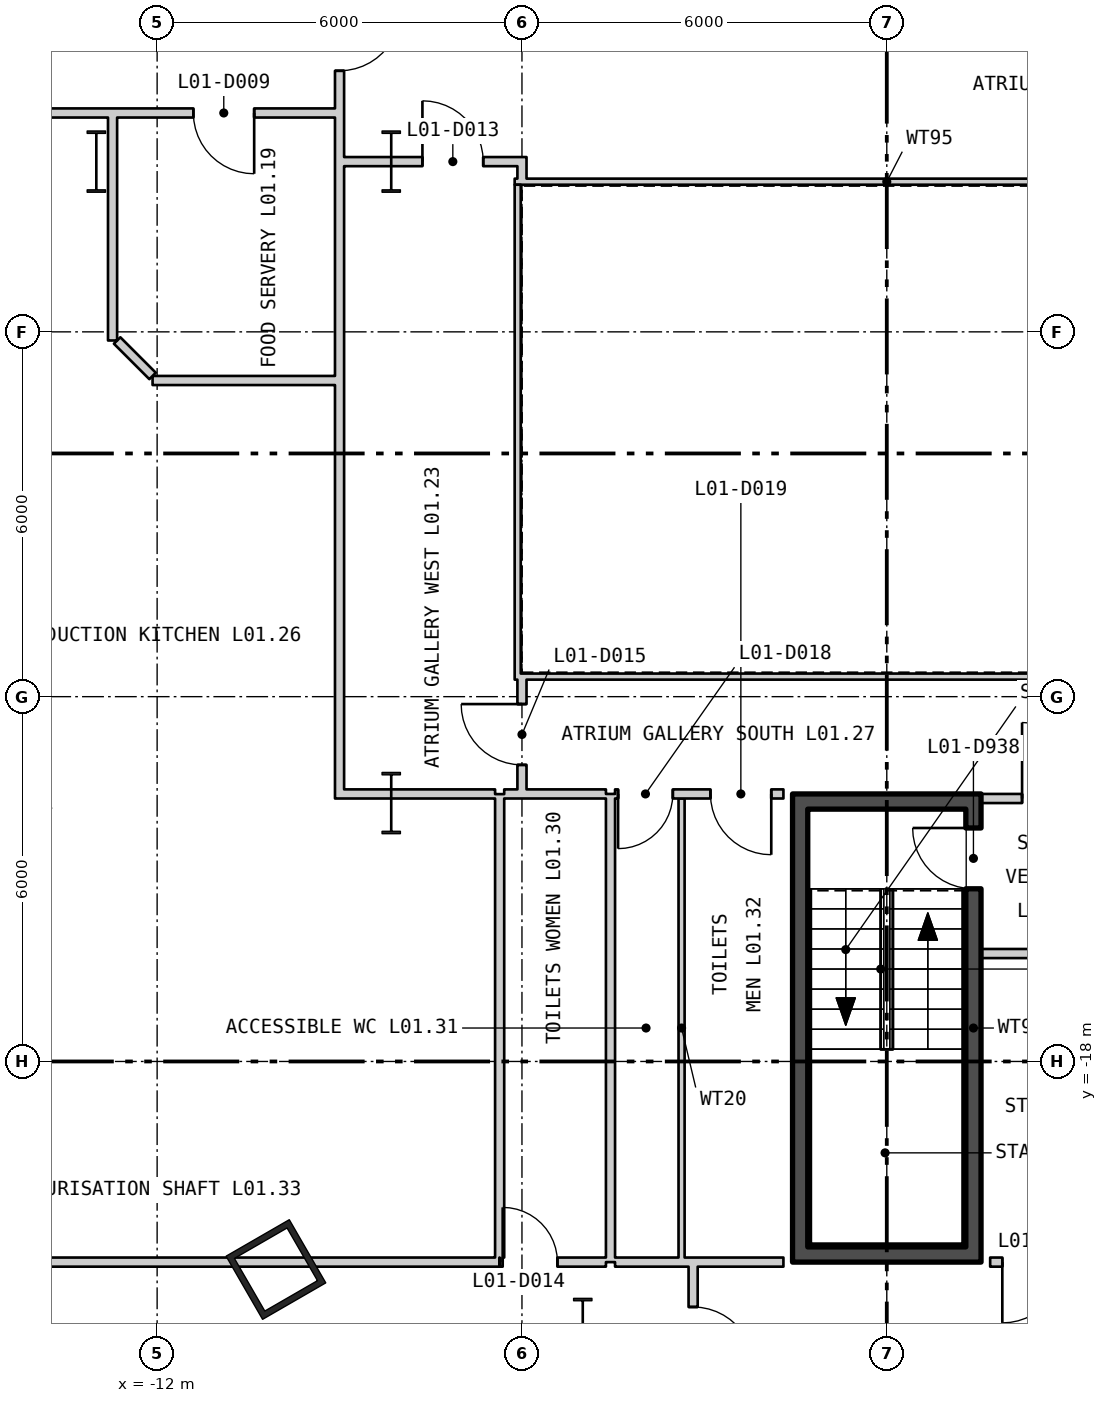
"""IFC4 building model, lengths in metres.
Left out: names, types, materials, properties, quantities, classifications, styles, units other than length and angle.
Written with IfcOpenShell. Run it as: python <this file> out.ifc"""

import sys

from ifc_helpers import new_model, si_unit, direction, frame, frame_2d, origin, origin_2d, place, context, subcontext, project, spatial, rectangle, hollow_rectangle, i_section, extrude, element, fill, save


model = new_model("IFC4")
c1 = context("Model", 3, precision=1e-05, world=origin(), true_north=direction((0.0, 1.0)))
c2 = subcontext(c1, "Body", "Model", "MODEL_VIEW")
j1 = project(units=[si_unit("LENGTHUNIT", "METRE"), si_unit("PLANEANGLEUNIT", "RADIAN")], contexts=[c1])
p1 = place(None, origin())
s1 = spatial("IfcSite", under=j1, at=p1, CompositionType="ELEMENT")
p2 = place(p1, origin())
s2 = spatial("IfcBuilding", under=s1, at=p2, CompositionType="ELEMENT")
p3 = place(p2, frame((0.0, 0.0, 8.4)))
s3 = spatial("IfcBuildingStorey", under=s2, at=p3, CompositionType="ELEMENT", Elevation=8.4)
p4 = place(p3, frame((-10.046, -21.422, 0.0), z_axis=(0.0, 0.0, 1.0), x_axis=(0.5, -0.866025403784, 0.0)))
e1 = element("IfcColumn", 1, at=p4, inside=s3, PredefinedType="COLUMN", context=c2, shape_type="SweptSolid", body=[
    extrude(hollow_rectangle(XDim=1.2, YDim=1.2, WallThickness=0.1, at=origin_2d()), origin(), (0.0, 0.0, 1.0), 5.1),
])
for number, where, z_axis, x_axis in (
    (2, (-8.15, -3.2, 0.0), (0.0, 0.0, 1.0), (1.0, 0.0, 0.0)),
    (3, (-8.15, -13.75, 0.0), (0.0, 0.0, 1.0), (1.0, 0.0, 0.0)),
    (4, (-5.0, -22.4, 0.0), (0.0, 0.0, 1.0), (1.0, 0.0, 0.0)),
    (5, (-13.0, -3.2, 0.0), (0.0, 0.0, 1.0), (1.0, 0.0, 0.0)),
):
    element("IfcColumn", number, at=place(p3, frame(where, z_axis=z_axis, x_axis=x_axis)), inside=s3, PredefinedType="COLUMN", context=c2, shape_type="SweptSolid", body=[
        extrude(i_section(OverallWidth=0.302, OverallDepth=1.008, WebThickness=0.021, FlangeThickness=0.04, at=origin_2d()), origin(), (0.0, 0.0, 1.0), 5.1),
    ])
for number, where, z_axis, x_axis in (
    (6, (-6.12, -11.67, 0.0), (0.0, 0.0, 1.0), (1.0, 0.0, 0.0)),
    (7, (6.12, -3.53, 0.0), (0.0, 0.0, 1.0), (-1.0, 0.0, 0.0)),
):
    element("IfcWall", number, at=place(p3, frame(where, z_axis=z_axis, x_axis=x_axis)), inside=s3, PredefinedType="PARTITIONING", context=c2, shape_type="SweptSolid", body=[
        extrude(rectangle(XDim=12.24, YDim=0.1, at=frame_2d((6.12, 0.0))), origin(), (0.0, 0.0, 1.0), 4.88),
    ])
p5 = place(p3, frame((-6.07, -3.58, 0.0), z_axis=(0.0, 0.0, 1.0), x_axis=(0.0, -1.0, 0.0)))
e8 = element("IfcWall", 8, at=p5, inside=s3, PredefinedType="PARTITIONING", context=c2, shape_type="SweptSolid", body=[
    extrude(rectangle(XDim=8.04, YDim=0.1, at=frame_2d((4.02, 0.0))), origin(), (0.0, 0.0, 1.0), 4.88),
])
p6 = place(p3, frame((-1.425, -21.05, 0.0), z_axis=(0.0, 0.0, 1.0), x_axis=(0.0, 1.0, 0.0)))
e9 = element("IfcWall", 9, at=p6, inside=s3, PredefinedType="SHEAR", context=c2, shape_type="SweptSolid", body=[
    extrude(rectangle(XDim=7.2, YDim=0.25, at=frame_2d((3.6, 0.0))), origin(), (0.0, 0.0, 1.0), 4.88),
])
p7 = place(p3, frame((1.425, -21.05, 0.0), z_axis=(0.0, 0.0, 1.0), x_axis=(0.0, 1.0, 0.0)))
e10 = element("IfcWall", 10, at=p7, inside=s3, PredefinedType="SHEAR", context=c2, shape_type="SweptSolid", body=[
    extrude(rectangle(XDim=7.2, YDim=0.25, at=frame_2d((3.6, 0.0))), origin(), (0.0, 0.0, 1.0), 4.88),
])
p8 = place(p7, frame((5.89, 0.0, 0.0)))
e11 = element("IfcOpeningElement", 11, at=p8, cuts=e10, PredefinedType="OPENING", context=c2, shape_type="SweptSolid", body=[
    extrude(rectangle(XDim=1.0, YDim=2.1, at=frame_2d((0.5, 1.05))), frame((0.0, 0.135, 0.0), z_axis=(0.0, -1.0, 0.0), x_axis=(1.0, 0.0, 0.0)), (0.0, 0.0, 1.0), 0.27),
])
for number, where, z_axis, x_axis in (
    (12, (-1.55, -21.175, 0.0), (0.0, 0.0, 1.0), (1.0, 0.0, 0.0)),
    (13, (-1.55, -13.725, 0.0), (0.0, 0.0, 1.0), (1.0, 0.0, 0.0)),
):
    element("IfcWall", number, at=place(p3, frame(where, z_axis=z_axis, x_axis=x_axis)), inside=s3, PredefinedType="SHEAR", context=c2, shape_type="SweptSolid", body=[
        extrude(rectangle(XDim=3.1, YDim=0.25, at=frame_2d((1.55, 0.0))), origin(), (0.0, 0.0, 1.0), 4.88),
    ])
p9 = place(p3, frame((1.55, -16.225, 0.0), z_axis=(0.0, 0.0, 1.0), x_axis=(1.0, 0.0, 0.0)))
e14 = element("IfcWall", 14, at=p9, inside=s3, PredefinedType="PARTITIONING", context=c2, shape_type="SweptSolid", body=[
    extrude(rectangle(XDim=2.6, YDim=0.15, at=frame_2d((1.3, 0.0))), origin(), (0.0, 0.0, 1.0), 4.88),
])
p10 = place(p3, frame((1.55, -13.675, 0.0), z_axis=(0.0, 0.0, 1.0), x_axis=(1.0, 0.0, 0.0)))
e15 = element("IfcWall", 15, at=p10, inside=s3, PredefinedType="PARTITIONING", context=c2, shape_type="SweptSolid", body=[
    extrude(rectangle(XDim=2.6, YDim=0.15, at=frame_2d((1.3, 0.0))), origin(), (0.0, 0.0, 1.0), 3.97),
])
p11 = place(p10, frame((0.675, 0.0, 0.0)))
e16 = element("IfcOpeningElement", 16, at=p11, cuts=e15, PredefinedType="OPENING", context=c2, shape_type="SweptSolid", body=[
    extrude(rectangle(XDim=1.25, YDim=2.1, at=frame_2d((0.625, 1.05))), frame((0.0, 0.085, 0.0), z_axis=(0.0, -1.0, 0.0), x_axis=(1.0, 0.0, 0.0)), (0.0, 0.0, 1.0), 0.17),
])
p12 = place(p3, frame((-17.025, -21.3, 0.0), z_axis=(0.0, 0.0, 1.0), x_axis=(1.0, 0.0, 0.0)))
e17 = element("IfcWall", 17, at=p12, inside=s3, PredefinedType="PARTITIONING", context=c2, shape_type="SweptSolid", body=[
    extrude(rectangle(XDim=10.655, YDim=0.15, at=frame_2d((5.327, 0.0))), origin(), (0.0, 0.0, 1.0), 4.88),
])
p13 = place(p3, frame((-17.025, -2.4, 0.0), z_axis=(0.0, 0.0, 1.0), x_axis=(1.0, 0.0, 0.0)))
e18 = element("IfcWall", 18, at=p13, inside=s3, PredefinedType="PARTITIONING", context=c2, shape_type="SweptSolid", body=[
    extrude(rectangle(XDim=7.95, YDim=0.15, at=frame_2d((3.975, 0.0))), origin(), (0.0, 0.0, 1.0), 4.88),
])
p14 = place(p13, frame((5.621, 0.0, 0.0)))
e19 = element("IfcOpeningElement", 19, at=p14, cuts=e18, PredefinedType="OPENING", context=c2, shape_type="SweptSolid", body=[
    extrude(rectangle(XDim=1.0, YDim=2.1, at=frame_2d((0.5, 1.05))), frame((0.0, 0.085, 0.0), z_axis=(0.0, -1.0, 0.0), x_axis=(1.0, 0.0, 0.0)), (0.0, 0.0, 1.0), 0.17),
])
p15 = place(p3, frame((-12.733, -6.142, 0.0), z_axis=(0.0, 0.0, 1.0), x_axis=(0.0, 1.0, 0.0)))
e20 = element("IfcWall", 20, at=p15, inside=s3, PredefinedType="PARTITIONING", context=c2, shape_type="SweptSolid", body=[
    extrude(rectangle(XDim=3.042, YDim=0.15, at=frame_2d((1.521, 0.0))), origin(), (0.0, 0.0, 1.0), 4.19),
])
p16 = place(p3, frame((-12.733, -3.1, 0.0), z_axis=(0.0, 0.0, 1.0), x_axis=(0.0, 1.0, 0.0)))
e21 = element("IfcWall", 21, at=p16, inside=s3, PredefinedType="PARTITIONING", context=c2, shape_type="SweptSolid", body=[
    extrude(rectangle(XDim=0.625, YDim=0.15, at=frame_2d((0.312, 0.0))), origin(), (0.0, 0.0, 1.0), 4.28),
])
p17 = place(p3, frame((-12.658, -6.142, 0.0), z_axis=(0.0, 0.0, 1.0), x_axis=(0.707106781187, -0.707106781187, 0.0)))
e22 = element("IfcWall", 22, at=p17, inside=s3, PredefinedType="PARTITIONING", context=c2, shape_type="SweptSolid", body=[
    extrude(rectangle(XDim=0.825, YDim=0.15, at=frame_2d((0.412, 0.0))), origin(), (0.0, 0.0, 1.0), 4.88),
])
p18 = place(p3, frame((-12.075, -6.8, 0.0), z_axis=(0.0, 0.0, 1.0), x_axis=(1.0, 0.0, 0.0)))
e23 = element("IfcWall", 23, at=p18, inside=s3, PredefinedType="PARTITIONING", context=c2, shape_type="SweptSolid", body=[
    extrude(rectangle(XDim=3.0, YDim=0.15, at=frame_2d((1.5, 0.0))), origin(), (0.0, 0.0, 1.0), 4.88),
])
p19 = place(p3, frame((-9.0, -13.675, 0.0), z_axis=(0.0, 0.0, 1.0), x_axis=(0.0, 1.0, 0.0)))
e24 = element("IfcWall", 24, at=p19, inside=s3, PredefinedType="PARTITIONING", context=c2, shape_type="SweptSolid", body=[
    extrude(rectangle(XDim=13.675, YDim=0.15, at=frame_2d((6.838, 0.0))), origin(), (0.0, 0.0, 1.0), 4.88),
])
p20 = place(p19, frame((11.969, 0.0, 0.0)))
e25 = element("IfcOpeningElement", 25, at=p20, cuts=e24, PredefinedType="OPENING", context=c2, shape_type="SweptSolid", body=[
    extrude(rectangle(XDim=1.0, YDim=2.1, at=frame_2d((0.5, 1.05))), frame((0.0, 0.085, 0.0), z_axis=(0.0, -1.0, 0.0), x_axis=(1.0, 0.0, 0.0)), (0.0, 0.0, 1.0), 0.17),
])
p21 = place(p3, frame((-8.925, -13.6, 0.0), z_axis=(0.0, 0.0, 1.0), x_axis=(1.0, 0.0, 0.0)))
e26 = element("IfcWall", 26, at=p21, inside=s3, PredefinedType="PARTITIONING", context=c2, shape_type="SweptSolid", body=[
    extrude(rectangle(XDim=0.775, YDim=0.15, at=frame_2d((0.388, 0.0))), origin(), (0.0, 0.0, 1.0), 4.09),
])
p22 = place(p3, frame((-8.15, -13.6, 0.0), z_axis=(0.0, 0.0, 1.0), x_axis=(1.0, 0.0, 0.0)))
e27 = element("IfcWall", 27, at=p22, inside=s3, PredefinedType="PARTITIONING", context=c2, shape_type="SweptSolid", body=[
    extrude(rectangle(XDim=1.708, YDim=0.15, at=frame_2d((0.854, 0.0))), origin(), (0.0, 0.0, 1.0), 3.97),
])
p23 = place(p3, frame((-8.925, -3.2, 0.0), z_axis=(0.0, 0.0, 1.0), x_axis=(1.0, 0.0, 0.0)))
e28 = element("IfcWall", 28, at=p23, inside=s3, PredefinedType="PARTITIONING", context=c2, shape_type="SweptSolid", body=[
    extrude(rectangle(XDim=0.775, YDim=0.15, at=frame_2d((0.388, 0.0))), origin(), (0.0, 0.0, 1.0), 4.09),
])
p24 = place(p3, frame((-8.15, -3.2, 0.0), z_axis=(0.0, 0.0, 1.0), x_axis=(1.0, 0.0, 0.0)))
e29 = element("IfcWall", 29, at=p24, inside=s3, PredefinedType="PARTITIONING", context=c2, shape_type="SweptSolid", body=[
    extrude(rectangle(XDim=2.225, YDim=0.15, at=frame_2d((1.113, 0.0))), origin(), (0.0, 0.0, 1.0), 3.97),
])
p25 = place(p24, frame((0.513, 0.0, 0.0)))
e30 = element("IfcOpeningElement", 30, at=p25, cuts=e29, PredefinedType="OPENING", context=c2, shape_type="SweptSolid", body=[
    extrude(rectangle(XDim=1.0, YDim=2.1, at=frame_2d((0.5, 1.05))), frame((0.0, 0.085, 0.0), z_axis=(0.0, -1.0, 0.0), x_axis=(1.0, 0.0, 0.0)), (0.0, 0.0, 1.0), 0.17),
])
p26 = place(p3, frame((-6.367, -21.3, 0.0), z_axis=(0.0, 0.0, 1.0), x_axis=(1.0, 0.0, 0.0)))
e31 = element("IfcWall", 31, at=p26, inside=s3, PredefinedType="PARTITIONING", context=c2, shape_type="SweptSolid", body=[
    extrude(rectangle(XDim=1.748, YDim=0.15, at=frame_2d((0.874, 0.0))), origin(), (0.0, 0.0, 1.0), 4.88),
])
p27 = place(p26, frame((0.05, 0.0, 0.0)))
e32 = element("IfcOpeningElement", 32, at=p27, cuts=e31, PredefinedType="OPENING", context=c2, shape_type="SweptSolid", body=[
    extrude(rectangle(XDim=0.9, YDim=2.1, at=frame_2d((0.45, 1.05))), frame((0.0, 0.085, 0.0), z_axis=(0.0, -1.0, 0.0), x_axis=(1.0, 0.0, 0.0)), (0.0, 0.0, 1.0), 0.17),
])
p28 = place(p3, frame((-6.367, -21.225, 0.0), z_axis=(0.0, 0.0, 1.0), x_axis=(0.0, 1.0, 0.0)))
e33 = element("IfcWall", 33, at=p28, inside=s3, PredefinedType="PARTITIONING", context=c2, shape_type="SweptSolid", body=[
    extrude(rectangle(XDim=7.622, YDim=0.15, at=frame_2d((3.811, 0.0))), origin(), (0.0, 0.0, 1.0), 4.28),
])
p29 = place(p3, frame((-6.292, -13.6, 0.0), z_axis=(0.0, 0.0, 1.0), x_axis=(1.0, 0.0, 0.0)))
e34 = element("IfcWall", 34, at=p29, inside=s3, PredefinedType="PARTITIONING", context=c2, shape_type="SweptSolid", body=[
    extrude(rectangle(XDim=1.673, YDim=0.15, at=frame_2d((0.837, 0.0))), origin(), (0.0, 0.0, 1.0), 3.97),
])
p30 = place(p3, frame((-6.0, -13.525, 0.0), z_axis=(0.0, 0.0, 1.0), x_axis=(0.0, 1.0, 0.0)))
e35 = element("IfcWall", 35, at=p30, inside=s3, PredefinedType="PARTITIONING", context=c2, shape_type="SweptSolid", body=[
    extrude(rectangle(XDim=1.805, YDim=0.15, at=frame_2d((0.902, 0.0))), origin(), (0.0, 0.0, 1.0), 4.88),
])
p31 = place(p30, frame((0.403, 0.0, 0.0)))
e36 = element("IfcOpeningElement", 36, at=p31, cuts=e35, PredefinedType="OPENING", context=c2, shape_type="SweptSolid", body=[
    extrude(rectangle(XDim=1.0, YDim=2.1, at=frame_2d((0.5, 1.05))), frame((0.0, 0.085, 0.0), z_axis=(0.0, -1.0, 0.0), x_axis=(1.0, 0.0, 0.0)), (0.0, 0.0, 1.0), 0.17),
])
p32 = place(p3, frame((-6.0, -3.48, 0.0), z_axis=(0.0, 0.0, 1.0), x_axis=(0.0, 1.0, 0.0)))
e37 = element("IfcWall", 37, at=p32, inside=s3, PredefinedType="PARTITIONING", context=c2, shape_type="SweptSolid", body=[
    extrude(rectangle(XDim=0.205, YDim=0.15, at=frame_2d((0.102, 0.0))), origin(), (0.0, 0.0, 1.0), 4.88),
])
p33 = place(p3, frame((-4.544, -21.3, 0.0), z_axis=(0.0, 0.0, 1.0), x_axis=(0.0, 1.0, 0.0)))
e38 = element("IfcWall", 38, at=p33, inside=s3, PredefinedType="PARTITIONING", context=c2, shape_type="SweptSolid", body=[
    extrude(rectangle(XDim=7.7, YDim=0.15, at=frame_2d((3.85, 0.0))), origin(), (0.0, 0.0, 1.0), 4.88),
])
p34 = place(p3, frame((-4.469, -21.3, 0.0), z_axis=(0.0, 0.0, 1.0), x_axis=(1.0, 0.0, 0.0)))
e39 = element("IfcWall", 39, at=p34, inside=s3, PredefinedType="PARTITIONING", context=c2, shape_type="SweptSolid", body=[
    extrude(rectangle(XDim=2.769, YDim=0.15, at=frame_2d((1.385, 0.0))), origin(), (0.0, 0.0, 1.0), 4.88),
])
p35 = place(p3, frame((-4.469, -13.6, 0.0), z_axis=(0.0, 0.0, 1.0), x_axis=(1.0, 0.0, 0.0)))
e40 = element("IfcWall", 40, at=p35, inside=s3, PredefinedType="PARTITIONING", context=c2, shape_type="SweptSolid", body=[
    extrude(rectangle(XDim=2.769, YDim=0.15, at=frame_2d((1.385, 0.0))), origin(), (0.0, 0.0, 1.0), 3.97),
])
p36 = place(p35, frame((0.05, 0.0, 0.0)))
e41 = element("IfcOpeningElement", 41, at=p36, cuts=e40, PredefinedType="OPENING", context=c2, shape_type="SweptSolid", body=[
    extrude(rectangle(XDim=0.9, YDim=2.1, at=frame_2d((0.45, 1.05))), frame((0.0, 0.085, 0.0), z_axis=(0.0, -1.0, 0.0), x_axis=(1.0, 0.0, 0.0)), (0.0, 0.0, 1.0), 0.17),
])
p37 = place(p35, frame((1.569, 0.0, 0.0)))
e42 = element("IfcOpeningElement", 42, at=p37, cuts=e40, PredefinedType="OPENING", context=c2, shape_type="SweptSolid", body=[
    extrude(rectangle(XDim=1.0, YDim=2.1, at=frame_2d((0.5, 1.05))), frame((0.0, 0.085, 0.0), z_axis=(0.0, -1.0, 0.0), x_axis=(1.0, 0.0, 0.0)), (0.0, 0.0, 1.0), 0.17),
])
p38 = place(p3, frame((-3.375, -21.225, 0.0), z_axis=(0.0, 0.0, 1.0), x_axis=(0.0, 1.0, 0.0)))
e43 = element("IfcWall", 43, at=p38, inside=s3, PredefinedType="PARTITIONING", context=c2, shape_type="SweptSolid", body=[
    extrude(rectangle(XDim=7.55, YDim=0.1, at=frame_2d((3.775, 0.0))), origin(), (0.0, 0.0, 1.0), 4.88),
])
p39 = place(p3, frame((-3.185, -23.7, 0.0), z_axis=(0.0, 0.0, 1.0), x_axis=(0.0, 1.0, 0.0)))
e44 = element("IfcWall", 44, at=p39, inside=s3, PredefinedType="PARTITIONING", context=c2, shape_type="SweptSolid", body=[
    extrude(rectangle(XDim=2.325, YDim=0.15, at=frame_2d((1.163, 0.0))), origin(), (0.0, 0.0, 1.0), 4.28),
])
p40 = place(p39, frame((0.662, 0.0, 0.0)))
e45 = element("IfcOpeningElement", 45, at=p40, cuts=e44, PredefinedType="OPENING", context=c2, shape_type="SweptSolid", body=[
    extrude(rectangle(XDim=1.0, YDim=2.1, at=frame_2d((0.5, 1.05))), frame((0.0, 0.085, 0.0), z_axis=(0.0, -1.0, 0.0), x_axis=(1.0, 0.0, 0.0)), (0.0, 0.0, 1.0), 0.17),
])
p41 = place(p3, frame((1.7, -21.3, 0.0), z_axis=(0.0, 0.0, 1.0), x_axis=(1.0, 0.0, 0.0)))
e46 = element("IfcWall", 46, at=p41, inside=s3, PredefinedType="PARTITIONING", context=c2, shape_type="SweptSolid", body=[
    extrude(rectangle(XDim=15.325, YDim=0.15, at=frame_2d((7.662, 0.0))), origin(), (0.0, 0.0, 1.0), 4.88),
])
p42 = place(p41, frame((0.2, 0.0, 0.0)))
e47 = element("IfcOpeningElement", 47, at=p42, cuts=e46, PredefinedType="OPENING", context=c2, shape_type="SweptSolid", body=[
    extrude(rectangle(XDim=1.0, YDim=2.1, at=frame_2d((0.5, 1.05))), frame((0.0, 0.085, 0.0), z_axis=(0.0, -1.0, 0.0), x_axis=(1.0, 0.0, 0.0)), (0.0, 0.0, 1.0), 0.17),
])
p43 = place(p8, origin())
e48 = element("IfcDoor", 48, at=p43, inside=s3, OperationType="SINGLE_SWING_LEFT", PredefinedType="DOOR", context=c2, shape_type="SweptSolid", body=[
    extrude(rectangle(XDim=1.0, YDim=2.1, at=frame_2d((0.5, 1.05))), frame((0.0, 0.025, 0.0), z_axis=(0.0, -1.0, 0.0), x_axis=(1.0, 0.0, 0.0)), (0.0, 0.0, 1.0), 0.05),
])
fill(e11, e48)
p44 = place(p11, origin())
e49 = element("IfcDoor", 49, at=p44, inside=s3, OperationType="SINGLE_SWING_RIGHT", PredefinedType="DOOR", context=c2, shape_type="SweptSolid", body=[
    extrude(rectangle(XDim=1.25, YDim=2.1, at=frame_2d((0.625, 1.05))), frame((0.0, 0.025, 0.0), z_axis=(0.0, -1.0, 0.0), x_axis=(1.0, 0.0, 0.0)), (0.0, 0.0, 1.0), 0.05),
])
fill(e16, e49)
p45 = place(p14, origin())
e50 = element("IfcDoor", 50, at=p45, inside=s3, OperationType="SINGLE_SWING_RIGHT", PredefinedType="DOOR", context=c2, shape_type="SweptSolid", body=[
    extrude(rectangle(XDim=1.0, YDim=2.1, at=frame_2d((0.5, 1.05))), frame((0.0, 0.025, 0.0), z_axis=(0.0, -1.0, 0.0), x_axis=(1.0, 0.0, 0.0)), (0.0, 0.0, 1.0), 0.05),
])
fill(e19, e50)
p46 = place(p20, origin())
e51 = element("IfcDoor", 51, at=p46, inside=s3, OperationType="SINGLE_SWING_RIGHT", PredefinedType="DOOR", context=c2, shape_type="SweptSolid", body=[
    extrude(rectangle(XDim=1.0, YDim=2.1, at=frame_2d((0.5, 1.05))), frame((0.0, 0.025, 0.0), z_axis=(0.0, -1.0, 0.0), x_axis=(1.0, 0.0, 0.0)), (0.0, 0.0, 1.0), 0.05),
])
fill(e25, e51)
p47 = place(p25, origin())
e52 = element("IfcDoor", 52, at=p47, inside=s3, OperationType="SINGLE_SWING_RIGHT", PredefinedType="DOOR", context=c2, shape_type="SweptSolid", body=[
    extrude(rectangle(XDim=1.0, YDim=2.1, at=frame_2d((0.5, 1.05))), frame((0.0, 0.025, 0.0), z_axis=(0.0, -1.0, 0.0), x_axis=(1.0, 0.0, 0.0)), (0.0, 0.0, 1.0), 0.05),
])
fill(e30, e52)
p48 = place(p27, origin())
e53 = element("IfcDoor", 53, at=p48, inside=s3, OperationType="SINGLE_SWING_RIGHT", PredefinedType="DOOR", context=c2, shape_type="SweptSolid", body=[
    extrude(rectangle(XDim=0.9, YDim=2.1, at=frame_2d((0.45, 1.05))), frame((0.0, 0.025, 0.0), z_axis=(0.0, -1.0, 0.0), x_axis=(1.0, 0.0, 0.0)), (0.0, 0.0, 1.0), 0.05),
])
fill(e32, e53)
p49 = place(p31, origin())
e54 = element("IfcDoor", 54, at=p49, inside=s3, OperationType="SINGLE_SWING_LEFT", PredefinedType="DOOR", context=c2, shape_type="SweptSolid", body=[
    extrude(rectangle(XDim=1.0, YDim=2.1, at=frame_2d((0.5, 1.05))), frame((0.0, 0.025, 0.0), z_axis=(0.0, -1.0, 0.0), x_axis=(1.0, 0.0, 0.0)), (0.0, 0.0, 1.0), 0.05),
])
fill(e36, e54)
p50 = place(p36, origin())
e55 = element("IfcDoor", 55, at=p50, inside=s3, OperationType="SINGLE_SWING_LEFT", PredefinedType="DOOR", context=c2, shape_type="SweptSolid", body=[
    extrude(rectangle(XDim=0.9, YDim=2.1, at=frame_2d((0.45, 1.05))), frame((0.0, 0.025, 0.0), z_axis=(0.0, -1.0, 0.0), x_axis=(1.0, 0.0, 0.0)), (0.0, 0.0, 1.0), 0.05),
])
fill(e41, e55)
p51 = place(p37, origin())
e56 = element("IfcDoor", 56, at=p51, inside=s3, OperationType="SINGLE_SWING_RIGHT", PredefinedType="DOOR", context=c2, shape_type="SweptSolid", body=[
    extrude(rectangle(XDim=1.0, YDim=2.1, at=frame_2d((0.5, 1.05))), frame((0.0, 0.025, 0.0), z_axis=(0.0, -1.0, 0.0), x_axis=(1.0, 0.0, 0.0)), (0.0, 0.0, 1.0), 0.05),
])
fill(e42, e56)
p52 = place(p40, origin())
e57 = element("IfcDoor", 57, at=p52, inside=s3, OperationType="SINGLE_SWING_LEFT", PredefinedType="DOOR", context=c2, shape_type="SweptSolid", body=[
    extrude(rectangle(XDim=1.0, YDim=2.1, at=frame_2d((0.5, 1.05))), frame((0.0, 0.025, 0.0), z_axis=(0.0, -1.0, 0.0), x_axis=(1.0, 0.0, 0.0)), (0.0, 0.0, 1.0), 0.05),
])
fill(e45, e57)
p53 = place(p42, origin())
e58 = element("IfcDoor", 58, at=p53, inside=s3, OperationType="SINGLE_SWING_LEFT", PredefinedType="DOOR", context=c2, shape_type="SweptSolid", body=[
    extrude(rectangle(XDim=1.0, YDim=2.1, at=frame_2d((0.5, 1.05))), frame((0.0, 0.025, 0.0), z_axis=(0.0, -1.0, 0.0), x_axis=(1.0, 0.0, 0.0)), (0.0, 0.0, 1.0), 0.05),
])
fill(e47, e58)
save(model, sys.argv[1])
